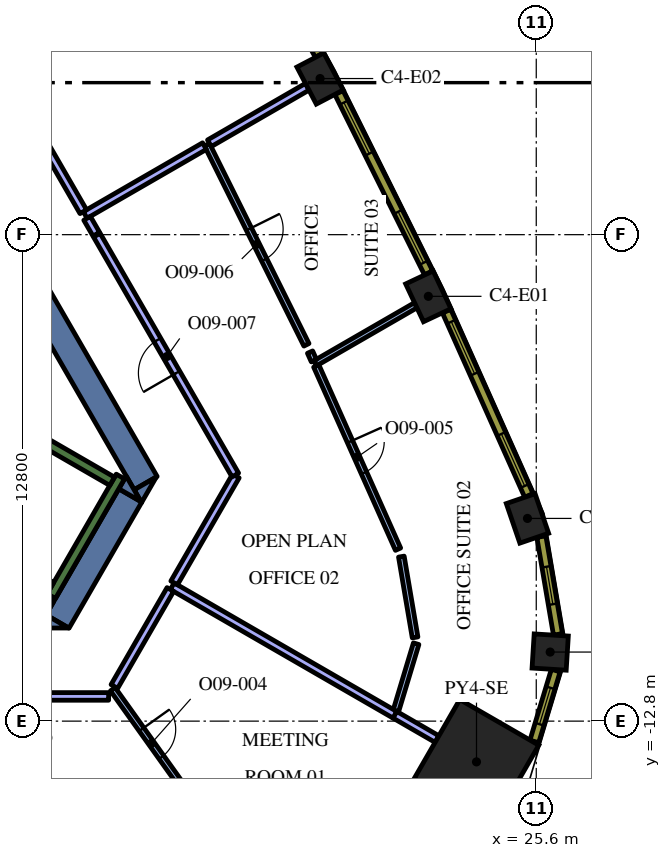
"""IFC4 building model, lengths in metres.
Left out: names, types, materials, properties, quantities, classifications, styles, units other than length and angle.
Written with IfcOpenShell. Run it as: python <this file> out.ifc"""

import sys

from ifc_helpers import new_model, si_unit, direction, frame, frame_2d, origin, origin_2d, place, context, subcontext, project, spatial, polyline, rectangle, outline, extrude, element, fill, save


model = new_model("IFC4")
c1 = context("Model", 3, precision=1e-05, world=origin(), true_north=direction((0.0, 1.0)))
c2 = subcontext(c1, "Body", "Model", "MODEL_VIEW")
j1 = project(units=[si_unit("LENGTHUNIT", "METRE"), si_unit("PLANEANGLEUNIT", "RADIAN")], contexts=[c1])
p1 = place(None, origin())
s1 = spatial("IfcSite", under=j1, at=p1, CompositionType="ELEMENT")
p2 = place(p1, origin())
s2 = spatial("IfcBuilding", under=s1, at=p2, CompositionType="ELEMENT")
p3 = place(p2, frame((0.0, 0.0, 247.8)))
s3 = spatial("IfcBuildingStorey", under=s2, at=p3, CompositionType="ELEMENT", Elevation=247.8)
p4 = place(p3, frame((24.027, -13.872, 0.0), z_axis=(0.0, 0.0, 1.0), x_axis=(0.866025403784, -0.5, 0.0)))
e1 = element("IfcColumn", 1, at=p4, inside=s3, PredefinedType="COLUMN", context=c2, shape_type="SweptSolid", body=[
    extrude(rectangle(XDim=2.4, YDim=2.4, at=origin_2d()), origin(), (0.0, 0.0, 1.0), 4.2),
])
p5 = place(p3, frame((25.967, -10.982, 0.0), z_axis=(0.0, 0.0, 1.0), x_axis=(0.062217428964, 0.998062619044, 0.0)))
e2 = element("IfcColumn", 2, at=p5, inside=s3, PredefinedType="COLUMN", context=c2, shape_type="SweptSolid", body=[
    extrude(rectangle(XDim=0.9, YDim=0.9, at=origin_2d()), origin(), (0.0, 0.0, 1.0), 4.2),
])
for number, where, z_axis, x_axis in (
    (3, (25.369, -7.466, 0.0), (0.0, 0.0, 1.0), (-0.324, 0.946, 0.0)),
    (4, (22.76, -1.623, 0.0), (0.0, 0.0, 1.0), (-0.426, 0.905, 0.0)),
    (5, (19.912, 4.108, 0.0), (0.0, 0.0, 1.0), (-0.464, 0.886, 0.0)),
):
    element("IfcColumn", number, at=place(p3, frame(where, z_axis=z_axis, x_axis=x_axis)), inside=s3, PredefinedType="COLUMN", context=c2, shape_type="SweptSolid", body=[
        extrude(rectangle(XDim=1.1, YDim=0.8, at=origin_2d()), origin(), (0.0, 0.0, 1.0), 4.2),
    ])
p6 = place(p3, frame((9.085, 4.264, 0.0), z_axis=(0.0, 0.0, 1.0), x_axis=(0.499998082512, -0.866026510844, 0.0)))
e6 = element("IfcWall", 6, at=p6, inside=s3, PredefinedType="SOLIDWALL", context=c2, shape_type="SweptSolid", body=[
    extrude(rectangle(XDim=12.472, YDim=0.7, at=frame_2d((6.236, 0.0))), origin(), (0.0, 0.0, 1.0), 4.2),
])
p7 = place(p3, origin())
e7 = element("IfcWall", 7, at=p7, inside=s3, PredefinedType="SOLIDWALL", context=c2, shape_type="SweptSolid", body=[
    extrude(outline(polyline([(15.213, -7.05), (15.019, -6.714), (15.601, -6.378), (15.213, -7.05)])), origin(), (0.0, 0.0, 1.0), 4.2),
])
p8 = place(p3, frame((13.003, -10.179, 0.0), z_axis=(0.0, 0.0, 1.0), x_axis=(0.499972675833, 0.866041178825, 0.0)))
e8 = element("IfcWall", 8, at=p8, inside=s3, PredefinedType="SOLIDWALL", context=c2, shape_type="SweptSolid", body=[
    extrude(rectangle(XDim=3.829, YDim=0.7, at=frame_2d((1.915, 0.0))), origin(), (0.0, 0.0, 1.0), 4.2),
])
e9 = element("IfcWall", 9, at=p7, inside=s3, PredefinedType="SOLIDWALL", context=c2, shape_type="SweptSolid", body=[
    extrude(outline(polyline([(12.5, -10.35), (12.698, -10.005), (13.296, -10.35), (12.5, -10.35)])), origin(), (0.0, 0.0, 1.0), 4.2),
])
e10 = element("IfcWall", 10, at=p7, inside=s3, PredefinedType="SOLIDWALL", context=c2, shape_type="SweptSolid", body=[
    extrude(outline(polyline([(14.809, -6.35), (15.197, -7.022), (14.615, -6.686), (14.809, -6.35)])), origin(), (0.0, 0.0, 1.0), 4.2),
])
e11 = element("IfcWall", 11, at=p7, inside=s3, PredefinedType="SOLIDWALL", context=c2, shape_type="SweptSolid", body=[
    extrude(outline(polyline([(12.904, -9.65), (12.516, -10.322), (12.516, -9.65), (12.904, -9.65)])), origin(), (0.0, 0.0, 1.0), 4.2),
])
p9 = place(p3, frame((12.84, -9.511, 0.0), z_axis=(0.0, 0.0, 1.0), x_axis=(0.500048121057, 0.865997619297, 0.0)))
e12 = element("IfcWall", 12, at=p9, inside=s3, PredefinedType="SOLIDWALL", context=c2, shape_type="SweptSolid", body=[
    extrude(rectangle(XDim=3.634, YDim=0.25, at=frame_2d((1.817, 0.0))), origin(), (0.0, 0.0, 1.0), 4.2),
])
p10 = place(p3, frame((12.84, -9.261, 0.0), z_axis=(0.0, 0.0, 1.0), x_axis=(-0.866013990052, 0.500019768644, 0.0)))
e13 = element("IfcWall", 13, at=p10, inside=s3, PredefinedType="SOLIDWALL", context=c2, shape_type="SweptSolid", body=[
    extrude(rectangle(XDim=6.8, YDim=0.25, at=frame_2d((3.4, 0.0))), origin(), (0.0, 0.0, 1.0), 4.2),
])
p11 = place(p3, frame((8.334, -2.964, 0.0), z_axis=(0.0, 0.0, 1.0), x_axis=(0.866016039709, -0.500016218704, 0.0)))
e14 = element("IfcWall", 14, at=p11, inside=s3, PredefinedType="SOLIDWALL", context=c2, shape_type="SweptSolid", body=[
    extrude(rectangle(XDim=7.05, YDim=0.25, at=frame_2d((3.525, 0.0))), origin(), (0.0, 0.0, 1.0), 4.2),
])
p12 = place(p3, frame((14.457, -11.96, 0.0), z_axis=(0.0, 0.0, 1.0), x_axis=(0.581049944662, -0.81386790194, 0.0)))
e15 = element("IfcWall", 15, at=p12, inside=s3, PredefinedType="PARTITIONING", context=c2, shape_type="SweptSolid", body=[
    extrude(rectangle(XDim=3.926, YDim=0.15, at=frame_2d((1.963, 0.0))), origin(), (0.0, 0.0, 1.0), 3.45),
])
p13 = place(p12, frame((1.3, 0.0, 0.0)))
e16 = element("IfcOpeningElement", 16, at=p13, cuts=e15, PredefinedType="OPENING", context=c2, shape_type="SweptSolid", body=[
    extrude(rectangle(XDim=0.9, YDim=2.1, at=frame_2d((0.45, 1.05))), frame((0.0, 0.085, 0.0), z_axis=(0.0, -1.0, 0.0), x_axis=(1.0, 0.0, 0.0)), (0.0, 0.0, 1.0), 0.17),
])
p14 = place(p3, frame((9.72, -12.15, 0.0), z_axis=(0.0, 0.0, 1.0), x_axis=(1.0, 0.0, 0.0)))
e17 = element("IfcWall", 17, at=p14, inside=s3, PredefinedType="PARTITIONING", context=c2, shape_type="SweptSolid", body=[
    extrude(rectangle(XDim=4.627, YDim=0.2, at=frame_2d((2.314, 0.0))), origin(), (0.0, 0.0, 1.0), 3.45),
])
p15 = place(p14, frame((1.8, 0.0, 0.0)))
e18 = element("IfcOpeningElement", 18, at=p15, cuts=e17, PredefinedType="OPENING", context=c2, shape_type="SweptSolid", body=[
    extrude(rectangle(XDim=1.0, YDim=2.1, at=frame_2d((0.5, 1.05))), frame((0.0, 0.11, 0.0), z_axis=(0.0, -1.0, 0.0), x_axis=(1.0, 0.0, 0.0)), (0.0, 0.0, 1.0), 0.22),
])
p16 = place(p3, frame((21.873, -12.628, 0.0), z_axis=(0.0, 0.0, 1.0), x_axis=(0.866052988967, -0.499952218018, 0.0)))
e19 = element("IfcWall", 19, at=p16, inside=s3, PredefinedType="PARTITIONING", context=c2, shape_type="SweptSolid", body=[
    extrude(rectangle(XDim=1.288, YDim=0.2, at=frame_2d((0.644, 0.0))), origin(), (0.0, 0.0, 1.0), 3.45),
])
p17 = place(p3, frame((16.021, -9.25, 0.0), z_axis=(0.0, 0.0, 1.0), x_axis=(0.86602692059, -0.499997372806, 0.0)))
e20 = element("IfcWall", 20, at=p17, inside=s3, PredefinedType="PARTITIONING", context=c2, shape_type="SweptSolid", body=[
    extrude(rectangle(XDim=6.765, YDim=0.2, at=frame_2d((3.382, 0.0))), origin(), (0.0, 0.0, 1.0), 3.45),
])
p18 = place(p3, frame((14.498, -11.888, 0.0), z_axis=(0.0, 0.0, 1.0), x_axis=(0.500006981563, 0.86602137294, 0.0)))
e21 = element("IfcWall", 21, at=p18, inside=s3, PredefinedType="PARTITIONING", context=c2, shape_type="SweptSolid", body=[
    extrude(rectangle(XDim=2.946, YDim=0.2, at=frame_2d((1.473, 0.0))), origin(), (0.0, 0.0, 1.0), 3.45),
])
p19 = place(p3, frame((19.78, -3.386, 0.0), z_axis=(0.0, 0.0, 1.0), x_axis=(0.866063280451, 0.49993438995, 0.0)))
e22 = element("IfcWall", 22, at=p19, inside=s3, PredefinedType="PARTITIONING", context=c2, shape_type="SweptSolid", body=[
    extrude(rectangle(XDim=3.058, YDim=0.15, at=frame_2d((1.529, 0.0))), origin(), (0.0, 0.0, 1.0), 3.45),
])
p20 = place(p3, frame((21.906, -12.532, 0.0), z_axis=(0.0, 0.0, 1.0), x_axis=(0.288789848591, 0.957392512688, 0.0)))
e23 = element("IfcWall", 23, at=p20, inside=s3, PredefinedType="PARTITIONING", context=c2, shape_type="SweptSolid", body=[
    extrude(rectangle(XDim=1.848, YDim=0.15, at=frame_2d((0.924, 0.0))), origin(), (0.0, 0.0, 1.0), 3.45),
])
p21 = place(p3, frame((22.412, -10.597, 0.0), z_axis=(0.0, 0.0, 1.0), x_axis=(-0.167612004459, 0.985853039738, 0.0)))
e24 = element("IfcWall", 24, at=p21, inside=s3, PredefinedType="PARTITIONING", context=c2, shape_type="SweptSolid", body=[
    extrude(rectangle(XDim=2.156, YDim=0.15, at=frame_2d((1.078, 0.0))), origin(), (0.0, 0.0, 1.0), 3.45),
])
p22 = place(p3, frame((19.811, -3.455, 0.0), z_axis=(0.0, 0.0, 1.0), x_axis=(0.407605393886, -0.913158169692, 0.0)))
e25 = element("IfcWall", 25, at=p22, inside=s3, PredefinedType="PARTITIONING", context=c2, shape_type="SweptSolid", body=[
    extrude(rectangle(XDim=5.279, YDim=0.15, at=frame_2d((2.64, 0.0))), origin(), (0.0, 0.0, 1.0), 3.45),
])
p23 = place(p22, frame((2.179, 0.0, 0.0)))
e26 = element("IfcOpeningElement", 26, at=p23, cuts=e25, PredefinedType="OPENING", context=c2, shape_type="SweptSolid", body=[
    extrude(rectangle(XDim=0.9, YDim=2.1, at=frame_2d((0.45, 1.05))), frame((0.0, 0.085, 0.0), z_axis=(0.0, -1.0, 0.0), x_axis=(1.0, 0.0, 0.0)), (0.0, 0.0, 1.0), 0.17),
])
p24 = place(p3, frame((19.75, -3.317, 0.0), z_axis=(0.0, 0.0, 1.0), x_axis=(-0.406774979688, 0.913528388119, 0.0)))
e27 = element("IfcWall", 27, at=p24, inside=s3, PredefinedType="PARTITIONING", context=c2, shape_type="SweptSolid", body=[
    extrude(rectangle(XDim=0.249, YDim=0.15, at=frame_2d((0.125, 0.0))), origin(), (0.0, 0.0, 1.0), 3.45),
])
p25 = place(p3, frame((16.935, 2.368, 0.0), z_axis=(0.0, 0.0, 1.0), x_axis=(0.445153322039, -0.895454365045, 0.0)))
e28 = element("IfcWall", 28, at=p25, inside=s3, PredefinedType="PARTITIONING", context=c2, shape_type="SweptSolid", body=[
    extrude(rectangle(XDim=5.881, YDim=0.15, at=frame_2d((2.94, 0.0))), origin(), (0.0, 0.0, 1.0), 3.45),
])
p26 = place(p25, frame((2.481, 0.0, 0.0)))
e29 = element("IfcOpeningElement", 29, at=p26, cuts=e28, PredefinedType="OPENING", context=c2, shape_type="SweptSolid", body=[
    extrude(rectangle(XDim=0.9, YDim=2.1, at=frame_2d((0.45, 1.05))), frame((0.0, 0.085, 0.0), z_axis=(0.0, -1.0, 0.0), x_axis=(1.0, 0.0, 0.0)), (0.0, 0.0, 1.0), 0.17),
])
p27 = place(p3, frame((17.0, 2.406, 0.0), z_axis=(0.0, 0.0, 1.0), x_axis=(0.86605561342, 0.499947671726, 0.0)))
e30 = element("IfcWall", 30, at=p27, inside=s3, PredefinedType="PARTITIONING", context=c2, shape_type="SweptSolid", body=[
    extrude(rectangle(XDim=2.971, YDim=0.2, at=frame_2d((1.486, 0.0))), origin(), (0.0, 0.0, 1.0), 3.45),
])
p28 = place(p3, frame((13.731, 0.518, 0.0), z_axis=(0.0, 0.0, 1.0), x_axis=(0.8660128559, 0.500021732944, 0.0)))
e31 = element("IfcWall", 31, at=p28, inside=s3, PredefinedType="PARTITIONING", context=c2, shape_type="SweptSolid", body=[
    extrude(rectangle(XDim=3.625, YDim=0.2, at=frame_2d((1.812, 0.0))), origin(), (0.0, 0.0, 1.0), 3.45),
])
p29 = place(p3, frame((14.022, 0.013, 0.0), z_axis=(0.0, 0.0, 1.0), x_axis=(-0.500159754115, 0.865933150054, 0.0)))
e32 = element("IfcWall", 32, at=p29, inside=s3, PredefinedType="PARTITIONING", context=c2, shape_type="SweptSolid", body=[
    extrude(rectangle(XDim=0.483, YDim=0.2, at=frame_2d((0.242, 0.0))), origin(), (0.0, 0.0, 1.0), 3.45),
])
p30 = place(p3, frame((16.072, -9.163, 0.0), z_axis=(0.0, 0.0, 1.0), x_axis=(0.500010870188, 0.866019127788, 0.0)))
e33 = element("IfcWall", 33, at=p30, inside=s3, PredefinedType="PARTITIONING", context=c2, shape_type="SweptSolid", body=[
    extrude(rectangle(XDim=3.249, YDim=0.2, at=frame_2d((1.624, 0.0))), origin(), (0.0, 0.0, 1.0), 3.45),
])
p31 = place(p3, frame((17.681, -6.324, 0.0), z_axis=(0.0, 0.0, 1.0), x_axis=(-0.50002695829, 0.866009838849, 0.0)))
e34 = element("IfcWall", 34, at=p31, inside=s3, PredefinedType="PARTITIONING", context=c2, shape_type="SweptSolid", body=[
    extrude(rectangle(XDim=7.287, YDim=0.2, at=frame_2d((3.644, 0.0))), origin(), (0.0, 0.0, 1.0), 3.45),
])
p32 = place(p31, frame((3.1, 0.0, 0.0)))
e35 = element("IfcOpeningElement", 35, at=p32, cuts=e34, PredefinedType="OPENING", context=c2, shape_type="SweptSolid", body=[
    extrude(rectangle(XDim=1.0, YDim=2.1, at=frame_2d((0.5, 1.05))), frame((0.0, 0.11, 0.0), z_axis=(0.0, -1.0, 0.0), x_axis=(1.0, 0.0, 0.0)), (0.0, 0.0, 1.0), 0.22),
])
p33 = place(p3, frame((13.681, 0.604, 0.0), z_axis=(0.0, 0.0, 1.0), x_axis=(-0.500001759768, 0.86602438778, 0.0)))
e36 = element("IfcWall", 36, at=p33, inside=s3, PredefinedType="PARTITIONING", context=c2, shape_type="SweptSolid", body=[
    extrude(rectangle(XDim=13.317, YDim=0.2, at=frame_2d((6.658, 0.0))), origin(), (0.0, 0.0, 1.0), 3.45),
])
p34 = place(p33, frame((6.2, 0.0, 0.0)))
e37 = element("IfcOpeningElement", 37, at=p34, cuts=e36, PredefinedType="OPENING", context=c2, shape_type="SweptSolid", body=[
    extrude(rectangle(XDim=1.0, YDim=2.1, at=frame_2d((0.5, 1.05))), frame((0.0, 0.11, 0.0), z_axis=(0.0, -1.0, 0.0), x_axis=(1.0, 0.0, 0.0)), (0.0, 0.0, 1.0), 0.22),
])
p35 = place(p3, frame((25.55, -13.335, 0.0), z_axis=(0.0, 0.0, 1.0), x_axis=(0.288727209095, 0.957411405159, 0.0)))
e38 = element("IfcWall", 38, at=p35, inside=s3, PredefinedType="SOLIDWALL", context=c2, shape_type="SweptSolid", body=[
    extrude(rectangle(XDim=1.948, YDim=0.24, at=frame_2d((0.974, 0.0))), origin(), (0.0, 0.0, 1.0), 3.95),
])
p36 = place(p35, frame((0.474, 0.0, 0.9)))
e39 = element("IfcOpeningElement", 39, at=p36, cuts=e38, PredefinedType="OPENING", context=c2, shape_type="SweptSolid", body=[
    extrude(rectangle(XDim=1.0, YDim=2.55, at=frame_2d((0.5, 1.275))), frame((0.0, 0.13, 0.0), z_axis=(0.0, -1.0, 0.0), x_axis=(1.0, 0.0, 0.0)), (0.0, 0.0, 1.0), 0.26),
])
p37 = place(p3, frame((26.172, -10.517, 0.0), z_axis=(0.0, 0.0, 1.0), x_axis=(-0.167660055546, 0.985844869021, 0.0)))
e40 = element("IfcWall", 40, at=p37, inside=s3, PredefinedType="SOLIDWALL", context=c2, shape_type="SweptSolid", body=[
    extrude(rectangle(XDim=2.609, YDim=0.24, at=frame_2d((1.305, 0.0))), origin(), (0.0, 0.0, 1.0), 3.95),
])
p38 = place(p37, frame((0.805, 0.0, 0.9)))
e41 = element("IfcOpeningElement", 41, at=p38, cuts=e40, PredefinedType="OPENING", context=c2, shape_type="SweptSolid", body=[
    extrude(rectangle(XDim=1.0, YDim=2.55, at=frame_2d((0.5, 1.275))), frame((0.0, 0.13, 0.0), z_axis=(0.0, -1.0, 0.0), x_axis=(1.0, 0.0, 0.0)), (0.0, 0.0, 1.0), 0.26),
])
p39 = place(p3, frame((25.405, -6.861, 0.0), z_axis=(0.0, 0.0, 1.0), x_axis=(-0.407579651789, 0.913169659728, 0.0)))
e42 = element("IfcWall", 42, at=p39, inside=s3, PredefinedType="SOLIDWALL", context=c2, shape_type="SweptSolid", body=[
    extrude(rectangle(XDim=5.311, YDim=0.24, at=frame_2d((2.655, 0.0))), origin(), (0.0, 0.0, 1.0), 3.95),
])
p40 = place(p39, frame((0.271, 0.0, 0.9)))
e43 = element("IfcOpeningElement", 43, at=p40, cuts=e42, PredefinedType="OPENING", context=c2, shape_type="SweptSolid", body=[
    extrude(rectangle(XDim=1.5, YDim=2.55, at=frame_2d((0.75, 1.275))), frame((0.0, 0.13, 0.0), z_axis=(0.0, -1.0, 0.0), x_axis=(1.0, 0.0, 0.0)), (0.0, 0.0, 1.0), 0.26),
])
p41 = place(p39, frame((3.504, 0.0, 0.9)))
e44 = element("IfcOpeningElement", 44, at=p41, cuts=e42, PredefinedType="OPENING", context=c2, shape_type="SweptSolid", body=[
    extrude(rectangle(XDim=1.5, YDim=2.55, at=frame_2d((0.75, 1.275))), frame((0.0, 0.13, 0.0), z_axis=(0.0, -1.0, 0.0), x_axis=(1.0, 0.0, 0.0)), (0.0, 0.0, 1.0), 0.26),
])
p42 = place(p3, frame((22.766, -1.005, 0.0), z_axis=(0.0, 0.0, 1.0), x_axis=(-0.445129582031, 0.895466166419, 0.0)))
e45 = element("IfcWall", 45, at=p42, inside=s3, PredefinedType="SOLIDWALL", context=c2, shape_type="SweptSolid", body=[
    extrude(rectangle(XDim=5.298, YDim=0.24, at=frame_2d((2.649, 0.0))), origin(), (0.0, 0.0, 1.0), 3.95),
])
p43 = place(p42, frame((0.295, 0.0, 0.9)))
e46 = element("IfcOpeningElement", 46, at=p43, cuts=e45, PredefinedType="OPENING", context=c2, shape_type="SweptSolid", body=[
    extrude(rectangle(XDim=1.5, YDim=2.55, at=frame_2d((0.75, 1.275))), frame((0.0, 0.13, 0.0), z_axis=(0.0, -1.0, 0.0), x_axis=(1.0, 0.0, 0.0)), (0.0, 0.0, 1.0), 0.26),
])
p44 = place(p42, frame((3.504, 0.0, 0.9)))
e47 = element("IfcOpeningElement", 47, at=p44, cuts=e45, PredefinedType="OPENING", context=c2, shape_type="SweptSolid", body=[
    extrude(rectangle(XDim=1.5, YDim=2.55, at=frame_2d((0.75, 1.275))), frame((0.0, 0.13, 0.0), z_axis=(0.0, -1.0, 0.0), x_axis=(1.0, 0.0, 0.0)), (0.0, 0.0, 1.0), 0.26),
])
p45 = place(p3, frame((19.892, 4.725, 0.0), z_axis=(0.0, 0.0, 1.0), x_axis=(-0.481925825015, 0.876212017256, 0.0)))
e48 = element("IfcWall", 48, at=p45, inside=s3, PredefinedType="SOLIDWALL", context=c2, shape_type="SweptSolid", body=[
    extrude(rectangle(XDim=5.299, YDim=0.24, at=frame_2d((2.649, 0.0))), origin(), (0.0, 0.0, 1.0), 3.95),
])
p46 = place(p45, frame((0.295, 0.0, 0.9)))
e49 = element("IfcOpeningElement", 49, at=p46, cuts=e48, PredefinedType="OPENING", context=c2, shape_type="SweptSolid", body=[
    extrude(rectangle(XDim=1.5, YDim=2.55, at=frame_2d((0.75, 1.275))), frame((0.0, 0.13, 0.0), z_axis=(0.0, -1.0, 0.0), x_axis=(1.0, 0.0, 0.0)), (0.0, 0.0, 1.0), 0.26),
])
p47 = place(p45, frame((3.504, 0.0, 0.9)))
e50 = element("IfcOpeningElement", 50, at=p47, cuts=e48, PredefinedType="OPENING", context=c2, shape_type="SweptSolid", body=[
    extrude(rectangle(XDim=1.5, YDim=2.55, at=frame_2d((0.75, 1.275))), frame((0.0, 0.13, 0.0), z_axis=(0.0, -1.0, 0.0), x_axis=(1.0, 0.0, 0.0)), (0.0, 0.0, 1.0), 0.26),
])
p48 = place(p13, origin())
e51 = element("IfcDoor", 51, at=p48, inside=s3, OperationType="SINGLE_SWING_LEFT", PredefinedType="DOOR", context=c2, shape_type="SweptSolid", body=[
    extrude(rectangle(XDim=0.9, YDim=2.1, at=frame_2d((0.45, 1.05))), frame((0.0, 0.025, 0.0), z_axis=(0.0, -1.0, 0.0), x_axis=(1.0, 0.0, 0.0)), (0.0, 0.0, 1.0), 0.05),
])
fill(e16, e51)
p49 = place(p23, origin())
e52 = element("IfcDoor", 52, at=p49, inside=s3, OperationType="SINGLE_SWING_LEFT", PredefinedType="DOOR", context=c2, shape_type="SweptSolid", body=[
    extrude(rectangle(XDim=0.9, YDim=2.1, at=frame_2d((0.45, 1.05))), frame((0.0, 0.025, 0.0), z_axis=(0.0, -1.0, 0.0), x_axis=(1.0, 0.0, 0.0)), (0.0, 0.0, 1.0), 0.05),
])
fill(e26, e52)
p50 = place(p26, origin())
e53 = element("IfcDoor", 53, at=p50, inside=s3, OperationType="SINGLE_SWING_LEFT", PredefinedType="DOOR", context=c2, shape_type="SweptSolid", body=[
    extrude(rectangle(XDim=0.9, YDim=2.1, at=frame_2d((0.45, 1.05))), frame((0.0, 0.025, 0.0), z_axis=(0.0, -1.0, 0.0), x_axis=(1.0, 0.0, 0.0)), (0.0, 0.0, 1.0), 0.05),
])
fill(e29, e53)
p51 = place(p32, origin())
e54 = element("IfcDoor", 54, at=p51, inside=s3, OperationType="SINGLE_SWING_LEFT", PredefinedType="DOOR", context=c2, shape_type="SweptSolid", body=[
    extrude(rectangle(XDim=1.0, YDim=2.1, at=frame_2d((0.5, 1.05))), frame((0.0, 0.025, 0.0), z_axis=(0.0, -1.0, 0.0), x_axis=(1.0, 0.0, 0.0)), (0.0, 0.0, 1.0), 0.05),
])
fill(e35, e54)
p52 = place(p36, origin())
e55 = element("IfcWindow", 55, at=p52, inside=s3, PartitioningType="SINGLE_PANEL", PredefinedType="WINDOW", context=c2, shape_type="SweptSolid", body=[
    extrude(rectangle(XDim=1.0, YDim=2.55, at=frame_2d((0.5, 1.275))), frame((0.0, 0.04, 0.0), z_axis=(0.0, -1.0, 0.0), x_axis=(1.0, 0.0, 0.0)), (0.0, 0.0, 1.0), 0.06),
])
fill(e39, e55)
p53 = place(p38, origin())
e56 = element("IfcWindow", 56, at=p53, inside=s3, PartitioningType="SINGLE_PANEL", PredefinedType="WINDOW", context=c2, shape_type="SweptSolid", body=[
    extrude(rectangle(XDim=1.0, YDim=2.55, at=frame_2d((0.5, 1.275))), frame((0.0, 0.04, 0.0), z_axis=(0.0, -1.0, 0.0), x_axis=(1.0, 0.0, 0.0)), (0.0, 0.0, 1.0), 0.06),
])
fill(e41, e56)
p54 = place(p40, origin())
e57 = element("IfcWindow", 57, at=p54, inside=s3, PartitioningType="SINGLE_PANEL", PredefinedType="WINDOW", context=c2, shape_type="SweptSolid", body=[
    extrude(rectangle(XDim=1.5, YDim=2.55, at=frame_2d((0.75, 1.275))), frame((0.0, 0.04, 0.0), z_axis=(0.0, -1.0, 0.0), x_axis=(1.0, 0.0, 0.0)), (0.0, 0.0, 1.0), 0.06),
])
fill(e43, e57)
p55 = place(p41, origin())
e58 = element("IfcWindow", 58, at=p55, inside=s3, PartitioningType="SINGLE_PANEL", PredefinedType="WINDOW", context=c2, shape_type="SweptSolid", body=[
    extrude(rectangle(XDim=1.5, YDim=2.55, at=frame_2d((0.75, 1.275))), frame((0.0, 0.04, 0.0), z_axis=(0.0, -1.0, 0.0), x_axis=(1.0, 0.0, 0.0)), (0.0, 0.0, 1.0), 0.06),
])
fill(e44, e58)
p56 = place(p43, origin())
e59 = element("IfcWindow", 59, at=p56, inside=s3, PartitioningType="SINGLE_PANEL", PredefinedType="WINDOW", context=c2, shape_type="SweptSolid", body=[
    extrude(rectangle(XDim=1.5, YDim=2.55, at=frame_2d((0.75, 1.275))), frame((0.0, 0.04, 0.0), z_axis=(0.0, -1.0, 0.0), x_axis=(1.0, 0.0, 0.0)), (0.0, 0.0, 1.0), 0.06),
])
fill(e46, e59)
p57 = place(p44, origin())
e60 = element("IfcWindow", 60, at=p57, inside=s3, PartitioningType="SINGLE_PANEL", PredefinedType="WINDOW", context=c2, shape_type="SweptSolid", body=[
    extrude(rectangle(XDim=1.5, YDim=2.55, at=frame_2d((0.75, 1.275))), frame((0.0, 0.04, 0.0), z_axis=(0.0, -1.0, 0.0), x_axis=(1.0, 0.0, 0.0)), (0.0, 0.0, 1.0), 0.06),
])
fill(e47, e60)
save(model, sys.argv[1])
